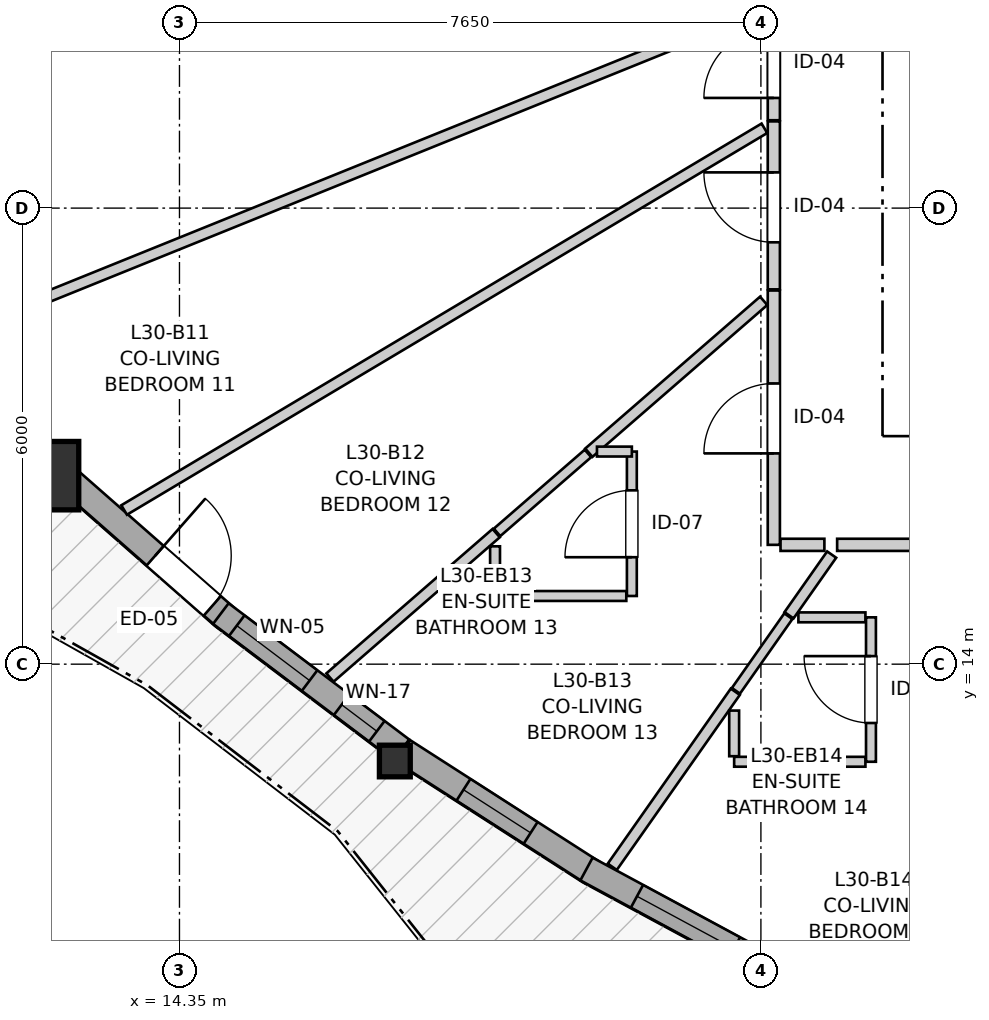
"""IFC4 building model, lengths in metres.
Left out: names, types, materials, properties, quantities, classifications, styles, units other than length and angle.
Written with IfcOpenShell. Run it as: python <this file> out.ifc"""

import sys

from ifc_helpers import new_model, si_unit, direction, frame, frame_2d, origin, origin_2d, place, context, subcontext, project, spatial, rectangle, i_section, extrude, source, transform, mapped, element, fill, save


model = new_model("IFC4")
c1 = context("Model", 3, precision=1e-05, world=origin(), true_north=direction((0.0, 1.0)))
c2 = subcontext(c1, "Body", "Model", "MODEL_VIEW")
j1 = project(units=[si_unit("LENGTHUNIT", "METRE"), si_unit("PLANEANGLEUNIT", "RADIAN")], contexts=[c1])
p1 = place(None, origin())
s1 = spatial("IfcSite", under=j1, at=p1, CompositionType="ELEMENT")
p2 = place(p1, origin())
s2 = spatial("IfcBuilding", under=s1, at=p2, CompositionType="ELEMENT")
p3 = place(p2, frame((0.0, 0.0, 102.4)))
s3 = spatial("IfcBuildingStorey", under=s2, at=p3, CompositionType="ELEMENT", Elevation=102.4)
m1 = source(origin(), c2, "Body", "SweptSolid", [
    extrude(rectangle(XDim=0.9, YDim=0.9, at=origin_2d()), origin(), (0.0, 0.0, 1.0), 2.95),
])
p4 = place(p3, frame((12.575, 16.48, 0.0), z_axis=(0.0, 0.0, 1.0), x_axis=(1.0, 0.0, 0.0)))
e1 = element("IfcColumn", 1, at=p4, inside=s3, PredefinedType="COLUMN", context=c2, shape_type="MappedRepresentation", body=[
    mapped(m1, transform((0.0, 0.0, 0.0), x_axis=(1.0, 0.0, 0.0), y_axis=(0.0, 1.0, 0.0), z_axis=(0.0, 0.0, 1.0), scale=1.0)),
])
m2 = source(origin(), c2, "Body", "SweptSolid", [
    extrude(i_section(OverallWidth=0.406, OverallDepth=0.416, WebThickness=0.027, FlangeThickness=0.044, FilletRadius=0.015, at=origin_2d()), origin(), (0.0, 0.0, 1.0), 2.95),
])
p5 = place(p3, frame((17.184, 12.726, 0.0), z_axis=(0.0, 0.0, 1.0), x_axis=(1.0, 0.0, 0.0)))
e2 = element("IfcColumn", 2, at=p5, inside=s3, PredefinedType="PILASTER", context=c2, shape_type="MappedRepresentation", body=[
    mapped(m2, transform((0.0, 0.0, 0.0), x_axis=(1.0, 0.0, 0.0), y_axis=(0.0, 1.0, 0.0), z_axis=(0.0, 0.0, 1.0), scale=1.0)),
])
p6 = place(p3, frame((12.86, 16.456, 0.0), z_axis=(0.0, 0.0, 1.0), x_axis=(0.751500349331, -0.659732692047, 0.0)))
e3 = element("IfcWall", 3, at=p6, inside=s3, PredefinedType="SOLIDWALL", context=c2, shape_type="SweptSolid", body=[
    extrude(rectangle(XDim=2.799, YDim=0.34, at=frame_2d((1.399, 0.0))), origin(), (0.0, 0.0, 1.0), 2.48),
])
p7 = place(p6, frame((1.559, 0.0, 0.0)))
e4 = element("IfcOpeningElement", 4, at=p7, cuts=e3, PredefinedType="OPENING", context=c2, shape_type="SweptSolid", body=[
    extrude(rectangle(XDim=1.0, YDim=2.1, at=frame_2d((0.5, 1.05))), frame((0.0, 0.18, 0.0), z_axis=(0.0, -1.0, 0.0), x_axis=(1.0, 0.0, 0.0)), (0.0, 0.0, 1.0), 0.36),
])
p8 = place(p3, frame((14.894, 14.665, 0.0), z_axis=(0.0, 0.0, 1.0), x_axis=(0.798431756537, -0.602085318001, 0.0)))
e5 = element("IfcWall", 5, at=p8, inside=s3, PredefinedType="SOLIDWALL", context=c2, shape_type="SweptSolid", body=[
    extrude(rectangle(XDim=2.976, YDim=0.34, at=frame_2d((1.488, 0.0))), origin(), (0.0, 0.0, 1.0), 2.48),
])
p9 = place(p8, frame((0.263, 0.0, 0.82)))
e6 = element("IfcOpeningElement", 6, at=p9, cuts=e5, PredefinedType="OPENING", context=c2, shape_type="SweptSolid", body=[
    extrude(rectangle(XDim=1.2, YDim=1.45, at=frame_2d((0.6, 0.725))), frame((0.0, 0.18, 0.0), z_axis=(0.0, -1.0, 0.0), x_axis=(1.0, 0.0, 0.0)), (0.0, 0.0, 1.0), 0.36),
])
p10 = place(p8, frame((1.991, 0.0, 0.82)))
e7 = element("IfcOpeningElement", 7, at=p10, cuts=e5, PredefinedType="OPENING", context=c2, shape_type="SweptSolid", body=[
    extrude(rectangle(XDim=0.58, YDim=1.35, at=frame_2d((0.29, 0.675))), frame((0.0, 0.18, 0.0), z_axis=(0.0, -1.0, 0.0), x_axis=(1.0, 0.0, 0.0)), (0.0, 0.0, 1.0), 0.36),
])
p11 = place(p3, frame((17.292, 12.858, 0.0), z_axis=(0.0, 0.0, 1.0), x_axis=(0.841524200167, -0.540219418878, 0.0)))
e8 = element("IfcWall", 8, at=p11, inside=s3, PredefinedType="SOLIDWALL", context=c2, shape_type="SweptSolid", body=[
    extrude(rectangle(XDim=2.958, YDim=0.34, at=frame_2d((1.479, 0.0))), origin(), (0.0, 0.0, 1.0), 2.48),
])
p12 = place(p11, frame((0.944, 0.0, 0.82)))
e9 = element("IfcOpeningElement", 9, at=p12, cuts=e8, PredefinedType="OPENING", context=c2, shape_type="SweptSolid", body=[
    extrude(rectangle(XDim=1.05, YDim=1.45, at=frame_2d((0.525, 0.725))), frame((0.0, 0.18, 0.0), z_axis=(0.0, -1.0, 0.0), x_axis=(1.0, 0.0, 0.0)), (0.0, 0.0, 1.0), 0.36),
])
p13 = place(p3, frame((19.705, 11.305, 0.0), z_axis=(0.0, 0.0, 1.0), x_axis=(0.880065774925, -0.474851799834, 0.0)))
e10 = element("IfcWall", 10, at=p13, inside=s3, PredefinedType="SOLIDWALL", context=c2, shape_type="SweptSolid", body=[
    extrude(rectangle(XDim=2.749, YDim=0.34, at=frame_2d((1.374, 0.0))), origin(), (0.0, 0.0, 1.0), 2.48),
])
p14 = place(p13, frame((0.755, 0.0, 0.82)))
e11 = element("IfcOpeningElement", 11, at=p14, cuts=e10, PredefinedType="OPENING", context=c2, shape_type="SweptSolid", body=[
    extrude(rectangle(XDim=1.45, YDim=1.25, at=frame_2d((0.725, 0.625))), frame((0.0, 0.18, 0.0), z_axis=(0.0, -1.0, 0.0), x_axis=(1.0, 0.0, 0.0)), (0.0, 0.0, 1.0), 0.36),
])
p15 = place(p3, frame((26.473, 15.57, 0.0), z_axis=(0.0, 0.0, 1.0), x_axis=(-1.0, 0.0, 0.0)))
e12 = element("IfcWall", 12, at=p15, inside=s3, PredefinedType="PARTITIONING", context=c2, shape_type="SweptSolid", body=[
    extrude(rectangle(XDim=3.47, YDim=0.16, at=frame_2d((1.735, 0.0))), origin(), (0.0, 0.0, 1.0), 2.95),
])
p16 = place(p15, frame((1.274, 0.0, 0.0)))
e13 = element("IfcOpeningElement", 13, at=p16, cuts=e12, PredefinedType="OPENING", context=c2, shape_type="SweptSolid", body=[
    extrude(rectangle(XDim=0.92, YDim=2.1, at=frame_2d((0.46, 1.05))), frame((0.0, 0.09, 0.0), z_axis=(0.0, -1.0, 0.0), x_axis=(1.0, 0.0, 0.0)), (0.0, 0.0, 1.0), 0.18),
])
p17 = place(p3, frame((22.17, 15.57, 0.0), z_axis=(0.0, 0.0, 1.0), x_axis=(0.0, 1.0, 0.0)))
e14 = element("IfcWall", 14, at=p17, inside=s3, PredefinedType="PARTITIONING", context=c2, shape_type="SweptSolid", body=[
    extrude(rectangle(XDim=3.346, YDim=0.16, at=frame_2d((1.673, 0.0))), origin(), (0.0, 0.0, 1.0), 2.95),
])
p18 = place(p17, frame((1.203, 0.0, 0.0)))
e15 = element("IfcOpeningElement", 15, at=p18, cuts=e14, PredefinedType="OPENING", context=c2, shape_type="SweptSolid", body=[
    extrude(rectangle(XDim=0.92, YDim=2.1, at=frame_2d((0.46, 1.05))), frame((0.0, 0.09, 0.0), z_axis=(0.0, -1.0, 0.0), x_axis=(1.0, 0.0, 0.0)), (0.0, 0.0, 1.0), 0.18),
])
p19 = place(p3, frame((22.17, 18.931, 0.0), z_axis=(0.0, 0.0, 1.0), x_axis=(0.0, 1.0, 0.0)))
e16 = element("IfcWall", 16, at=p19, inside=s3, PredefinedType="PARTITIONING", context=c2, shape_type="SweptSolid", body=[
    extrude(rectangle(XDim=2.21, YDim=0.16, at=frame_2d((1.105, 0.0))), origin(), (0.0, 0.0, 1.0), 2.95),
])
p20 = place(p19, frame((0.619, 0.0, 0.0)))
e17 = element("IfcOpeningElement", 17, at=p20, cuts=e16, PredefinedType="OPENING", context=c2, shape_type="SweptSolid", body=[
    extrude(rectangle(XDim=0.92, YDim=2.1, at=frame_2d((0.46, 1.05))), frame((0.0, 0.09, 0.0), z_axis=(0.0, -1.0, 0.0), x_axis=(1.0, 0.0, 0.0)), (0.0, 0.0, 1.0), 0.18),
])
p21 = place(p3, frame((20.302, 14.897, 0.0), z_axis=(0.0, 0.0, 1.0), x_axis=(0.0, 1.0, 0.0)))
e18 = element("IfcWall", 18, at=p21, inside=s3, PredefinedType="PARTITIONING", context=c2, shape_type="SweptSolid", body=[
    extrude(rectangle(XDim=1.9, YDim=0.13, at=frame_2d((0.95, 0.0))), origin(), (0.0, 0.0, 1.0), 2.95),
])
p22 = place(p21, frame((0.51, 0.0, 0.0)))
e19 = element("IfcOpeningElement", 19, at=p22, cuts=e18, PredefinedType="OPENING", context=c2, shape_type="SweptSolid", body=[
    extrude(rectangle(XDim=0.88, YDim=2.05, at=frame_2d((0.44, 1.025))), frame((0.0, 0.075, 0.0), z_axis=(0.0, -1.0, 0.0), x_axis=(1.0, 0.0, 0.0)), (0.0, 0.0, 1.0), 0.15),
])
p23 = place(p3, frame((23.448, 12.716, 0.0), z_axis=(0.0, 0.0, 1.0), x_axis=(0.0, 1.0, 0.0)))
e20 = element("IfcWall", 20, at=p23, inside=s3, PredefinedType="PARTITIONING", context=c2, shape_type="SweptSolid", body=[
    extrude(rectangle(XDim=1.9, YDim=0.13, at=frame_2d((0.95, 0.0))), origin(), (0.0, 0.0, 1.0), 2.95),
])
p24 = place(p23, frame((0.51, 0.0, 0.0)))
e21 = element("IfcOpeningElement", 21, at=p24, cuts=e20, PredefinedType="OPENING", context=c2, shape_type="SweptSolid", body=[
    extrude(rectangle(XDim=0.88, YDim=2.05, at=frame_2d((0.44, 1.025))), frame((0.0, 0.075, 0.0), z_axis=(0.0, -1.0, 0.0), x_axis=(1.0, 0.0, 0.0)), (0.0, 0.0, 1.0), 0.15),
])
p25 = place(p3, frame((22.17, 21.156, 0.0), z_axis=(0.0, 0.0, 1.0), x_axis=(0.0, 1.0, 0.0)))
e22 = element("IfcWall", 22, at=p25, inside=s3, PredefinedType="PARTITIONING", context=c2, shape_type="SweptSolid", body=[
    extrude(rectangle(XDim=1.555, YDim=0.16, at=frame_2d((0.777, 0.0))), origin(), (0.0, 0.0, 1.0), 2.95),
])
p26 = place(p25, frame((0.293, 0.0, 0.0)))
e23 = element("IfcOpeningElement", 23, at=p26, cuts=e22, PredefinedType="OPENING", context=c2, shape_type="SweptSolid", body=[
    extrude(rectangle(XDim=0.92, YDim=2.1, at=frame_2d((0.46, 1.05))), frame((0.0, 0.09, 0.0), z_axis=(0.0, -1.0, 0.0), x_axis=(1.0, 0.0, 0.0)), (0.0, 0.0, 1.0), 0.18),
])
p27 = place(p3, frame((11.28, 18.294, 0.0), z_axis=(0.0, 0.0, 1.0), x_axis=(0.927137862507, 0.374720407645, 0.0)))
e24 = element("IfcWall", 24, at=p27, inside=s3, PredefinedType="PARTITIONING", context=c2, shape_type="SweptSolid", body=[
    extrude(rectangle(XDim=11.622, YDim=0.145, at=frame_2d((5.811, 0.0))), origin(), (0.0, 0.0, 1.0), 2.95),
])
p28 = place(p3, frame((13.622, 16.028, 0.0), z_axis=(0.0, 0.0, 1.0), x_axis=(0.85896108151, 0.512040877716, 0.0)))
e25 = element("IfcWall", 25, at=p28, inside=s3, PredefinedType="PARTITIONING", context=c2, shape_type="SweptSolid", body=[
    extrude(rectangle(XDim=9.807, YDim=0.145, at=frame_2d((4.904, 0.0))), origin(), (0.0, 0.0, 1.0), 2.95),
])
p29 = place(p3, frame((19.736, 16.782, 0.0), z_axis=(0.0, 0.0, 1.0), x_axis=(0.754964216329, 0.655765988796, 0.0)))
e26 = element("IfcWall", 26, at=p29, inside=s3, PredefinedType="PARTITIONING", context=c2, shape_type="SweptSolid", body=[
    extrude(rectangle(XDim=3.047, YDim=0.145, at=frame_2d((1.523, 0.0))), origin(), (0.0, 0.0, 1.0), 2.95),
])
p30 = place(p3, frame((16.33, 13.824, 0.0), z_axis=(0.0, 0.0, 1.0), x_axis=(0.754843145593, 0.655905348013, 0.0)))
e27 = element("IfcWall", 27, at=p30, inside=s3, PredefinedType="PARTITIONING", context=c2, shape_type="SweptSolid", body=[
    extrude(rectangle(XDim=2.897, YDim=0.145, at=frame_2d((1.448, 0.0))), origin(), (0.0, 0.0, 1.0), 2.95),
])
p31 = place(p3, frame((20.044, 11.334, 0.0), z_axis=(0.0, 0.0, 1.0), x_axis=(0.575027113175, 0.818134352728, 0.0)))
e28 = element("IfcWall", 28, at=p31, inside=s3, PredefinedType="PARTITIONING", context=c2, shape_type="SweptSolid", body=[
    extrude(rectangle(XDim=2.815, YDim=0.145, at=frame_2d((1.407, 0.0))), origin(), (0.0, 0.0, 1.0), 2.95),
])
for number, where, z_axis, x_axis in (
    (29, (18.502, 14.897, 0.0), (0.0, 0.0, 1.0), (1.0, 0.0, 0.0)),
    (30, (21.648, 12.716, 0.0), (0.0, 0.0, 1.0), (1.0, 0.0, 0.0)),
):
    element("IfcWall", number, at=place(p3, frame(where, z_axis=z_axis, x_axis=x_axis)), inside=s3, PredefinedType="PARTITIONING", context=c2, shape_type="SweptSolid", body=[
        extrude(rectangle(XDim=1.727, YDim=0.13, at=frame_2d((0.864, 0.0))), origin(), (0.0, 0.0, 1.0), 2.95),
    ])
p32 = place(p3, frame((18.528, 15.734, 0.0), z_axis=(0.0, 0.0, 1.0), x_axis=(0.755063236967, 0.655651971843, 0.0)))
e31 = element("IfcWall", 31, at=p32, inside=s3, PredefinedType="PARTITIONING", context=c2, shape_type="SweptSolid", body=[
    extrude(rectangle(XDim=1.584, YDim=0.13, at=frame_2d((0.792, 0.0))), origin(), (0.0, 0.0, 1.0), 2.95),
])
p33 = place(p3, frame((21.671, 13.649, 0.0), z_axis=(0.0, 0.0, 1.0), x_axis=(0.574868196693, 0.81824602439, 0.0)))
e32 = element("IfcWall", 32, at=p33, inside=s3, PredefinedType="PARTITIONING", context=c2, shape_type="SweptSolid", body=[
    extrude(rectangle(XDim=1.2, YDim=0.13, at=frame_2d((0.6, 0.0))), origin(), (0.0, 0.0, 1.0), 2.95),
])
p34 = place(p3, frame((22.37, 14.643, 0.0), z_axis=(0.0, 0.0, 1.0), x_axis=(0.575022445487, 0.818137633401, 0.0)))
e33 = element("IfcWall", 33, at=p34, inside=s3, PredefinedType="PARTITIONING", context=c2, shape_type="SweptSolid", body=[
    extrude(rectangle(XDim=0.976, YDim=0.145, at=frame_2d((0.488, 0.0))), origin(), (0.0, 0.0, 1.0), 2.95),
])
p35 = place(p3, frame((22.493, 14.616, 0.0), z_axis=(0.0, 0.0, 1.0), x_axis=(1.0, 0.0, 0.0)))
e34 = element("IfcWall", 34, at=p35, inside=s3, PredefinedType="PARTITIONING", context=c2, shape_type="SweptSolid", body=[
    extrude(rectangle(XDim=0.882, YDim=0.13, at=frame_2d((0.441, 0.0))), origin(), (0.0, 0.0, 1.0), 2.95),
])
p36 = place(p3, frame((21.648, 12.789, 0.0), z_axis=(0.0, 0.0, 1.0), x_axis=(0.0, 1.0, 0.0)))
e35 = element("IfcWall", 35, at=p36, inside=s3, PredefinedType="PARTITIONING", context=c2, shape_type="SweptSolid", body=[
    extrude(rectangle(XDim=0.6, YDim=0.13, at=frame_2d((0.3, 0.0))), origin(), (0.0, 0.0, 1.0), 2.95),
])
p37 = place(p3, frame((22.258, 15.57, 0.0), z_axis=(0.0, 0.0, 1.0), x_axis=(1.0, 0.0, 0.0)))
e36 = element("IfcWall", 36, at=p37, inside=s3, PredefinedType="PARTITIONING", context=c2, shape_type="SweptSolid", body=[
    extrude(rectangle(XDim=0.577, YDim=0.16, at=frame_2d((0.289, 0.0))), origin(), (0.0, 0.0, 1.0), 2.95),
])
p38 = place(p3, frame((18.502, 14.97, 0.0), z_axis=(0.0, 0.0, 1.0), x_axis=(0.0, 1.0, 0.0)))
e37 = element("IfcWall", 37, at=p38, inside=s3, PredefinedType="PARTITIONING", context=c2, shape_type="SweptSolid", body=[
    extrude(rectangle(XDim=0.581, YDim=0.13, at=frame_2d((0.29, 0.0))), origin(), (0.0, 0.0, 1.0), 2.95),
])
p39 = place(p3, frame((19.843, 16.797, 0.0), z_axis=(0.0, 0.0, 1.0), x_axis=(1.0, 0.0, 0.0)))
e38 = element("IfcWall", 38, at=p39, inside=s3, PredefinedType="PARTITIONING", context=c2, shape_type="SweptSolid", body=[
    extrude(rectangle(XDim=0.459, YDim=0.13, at=frame_2d((0.229, 0.0))), origin(), (0.0, 0.0, 1.0), 2.95),
])
m3 = source(origin(), c2, "Body", "SweptSolid", [
    extrude(rectangle(XDim=1.2, YDim=1.45, at=frame_2d((0.6, 0.725))), frame((0.0, 0.03, 0.0), z_axis=(0.0, -1.0, 0.0), x_axis=(1.0, 0.0, 0.0)), (0.0, 0.0, 1.0), 0.06),
])
p40 = place(p9, origin())
e39 = element("IfcWindow", 39, at=p40, inside=s3, PartitioningType="SINGLE_PANEL", PredefinedType="WINDOW", context=c2, shape_type="MappedRepresentation", body=[
    mapped(m3, transform((0.0, 0.0, 0.0), x_axis=(1.0, 0.0, 0.0), y_axis=(0.0, 1.0, 0.0), z_axis=(0.0, 0.0, 1.0), scale=1.0)),
])
fill(e6, e39)
m4 = source(origin(), c2, "Body", "SweptSolid", [
    extrude(rectangle(XDim=0.58, YDim=1.35, at=frame_2d((0.29, 0.675))), frame((0.0, 0.03, 0.0), z_axis=(0.0, -1.0, 0.0), x_axis=(1.0, 0.0, 0.0)), (0.0, 0.0, 1.0), 0.06),
])
p41 = place(p10, origin())
e40 = element("IfcWindow", 40, at=p41, inside=s3, PartitioningType="SINGLE_PANEL", PredefinedType="WINDOW", context=c2, shape_type="MappedRepresentation", body=[
    mapped(m4, transform((0.0, 0.0, 0.0), x_axis=(1.0, 0.0, 0.0), y_axis=(0.0, 1.0, 0.0), z_axis=(0.0, 0.0, 1.0), scale=1.0)),
])
fill(e7, e40)
m5 = source(origin(), c2, "Body", "SweptSolid", [
    extrude(rectangle(XDim=1.05, YDim=1.45, at=frame_2d((0.525, 0.725))), frame((0.0, 0.03, 0.0), z_axis=(0.0, -1.0, 0.0), x_axis=(1.0, 0.0, 0.0)), (0.0, 0.0, 1.0), 0.06),
])
p42 = place(p12, origin())
e41 = element("IfcWindow", 41, at=p42, inside=s3, PartitioningType="SINGLE_PANEL", PredefinedType="WINDOW", context=c2, shape_type="MappedRepresentation", body=[
    mapped(m5, transform((0.0, 0.0, 0.0), x_axis=(1.0, 0.0, 0.0), y_axis=(0.0, 1.0, 0.0), z_axis=(0.0, 0.0, 1.0), scale=1.0)),
])
fill(e9, e41)
m6 = source(origin(), c2, "Body", "SweptSolid", [
    extrude(rectangle(XDim=1.45, YDim=1.25, at=frame_2d((0.725, 0.625))), frame((0.0, 0.03, 0.0), z_axis=(0.0, -1.0, 0.0), x_axis=(1.0, 0.0, 0.0)), (0.0, 0.0, 1.0), 0.06),
])
p43 = place(p14, origin())
e42 = element("IfcWindow", 42, at=p43, inside=s3, PartitioningType="SINGLE_PANEL", PredefinedType="WINDOW", context=c2, shape_type="MappedRepresentation", body=[
    mapped(m6, transform((0.0, 0.0, 0.0), x_axis=(1.0, 0.0, 0.0), y_axis=(0.0, 1.0, 0.0), z_axis=(0.0, 0.0, 1.0), scale=1.0)),
])
fill(e11, e42)
m7 = source(origin(), c2, "Body", "SweptSolid", [
    extrude(rectangle(XDim=1.0, YDim=2.1, at=frame_2d((0.5, 1.05))), frame((0.0, 0.025, 0.0), z_axis=(0.0, -1.0, 0.0), x_axis=(1.0, 0.0, 0.0)), (0.0, 0.0, 1.0), 0.05),
])
p44 = place(p7, origin())
e43 = element("IfcDoor", 43, at=p44, inside=s3, OperationType="SINGLE_SWING_LEFT", PredefinedType="DOOR", context=c2, shape_type="MappedRepresentation", body=[
    mapped(m7, transform((0.0, 0.0, 0.0), x_axis=(1.0, 0.0, 0.0), y_axis=(0.0, 1.0, 0.0), z_axis=(0.0, 0.0, 1.0), scale=1.0)),
])
fill(e4, e43)
m8 = source(origin(), c2, "Body", "SweptSolid", [
    extrude(rectangle(XDim=0.92, YDim=2.1, at=frame_2d((0.46, 1.05))), frame((0.0, 0.025, 0.0), z_axis=(0.0, -1.0, 0.0), x_axis=(1.0, 0.0, 0.0)), (0.0, 0.0, 1.0), 0.05),
])
p45 = place(p18, origin())
e44 = element("IfcDoor", 44, at=p45, inside=s3, OperationType="SINGLE_SWING_LEFT", PredefinedType="DOOR", context=c2, shape_type="MappedRepresentation", body=[
    mapped(m8, transform((0.0, 0.0, 0.0), x_axis=(1.0, 0.0, 0.0), y_axis=(0.0, 1.0, 0.0), z_axis=(0.0, 0.0, 1.0), scale=1.0)),
])
fill(e15, e44)
p46 = place(p20, origin())
e45 = element("IfcDoor", 45, at=p46, inside=s3, OperationType="SINGLE_SWING_RIGHT", PredefinedType="DOOR", context=c2, shape_type="MappedRepresentation", body=[
    mapped(m8, transform((0.0, 0.0, 0.0), x_axis=(1.0, 0.0, 0.0), y_axis=(0.0, 1.0, 0.0), z_axis=(0.0, 0.0, 1.0), scale=1.0)),
])
fill(e17, e45)
m9 = source(origin(), c2, "Body", "SweptSolid", [
    extrude(rectangle(XDim=0.88, YDim=2.05, at=frame_2d((0.44, 1.025))), frame((0.0, 0.025, 0.0), z_axis=(0.0, -1.0, 0.0), x_axis=(1.0, 0.0, 0.0)), (0.0, 0.0, 1.0), 0.05),
])
p47 = place(p22, origin())
e46 = element("IfcDoor", 46, at=p47, inside=s3, OperationType="SINGLE_SWING_LEFT", PredefinedType="DOOR", context=c2, shape_type="MappedRepresentation", body=[
    mapped(m9, transform((0.0, 0.0, 0.0), x_axis=(1.0, 0.0, 0.0), y_axis=(0.0, 1.0, 0.0), z_axis=(0.0, 0.0, 1.0), scale=1.0)),
])
fill(e19, e46)
p48 = place(p24, origin())
e47 = element("IfcDoor", 47, at=p48, inside=s3, OperationType="SINGLE_SWING_RIGHT", PredefinedType="DOOR", context=c2, shape_type="MappedRepresentation", body=[
    mapped(m9, transform((0.0, 0.0, 0.0), x_axis=(1.0, 0.0, 0.0), y_axis=(0.0, 1.0, 0.0), z_axis=(0.0, 0.0, 1.0), scale=1.0)),
])
fill(e21, e47)
p49 = place(p26, origin())
e48 = element("IfcDoor", 48, at=p49, inside=s3, OperationType="SINGLE_SWING_LEFT", PredefinedType="DOOR", context=c2, shape_type="MappedRepresentation", body=[
    mapped(m8, transform((0.0, 0.0, 0.0), x_axis=(1.0, 0.0, 0.0), y_axis=(0.0, 1.0, 0.0), z_axis=(0.0, 0.0, 1.0), scale=1.0)),
])
fill(e23, e48)
save(model, sys.argv[1])
